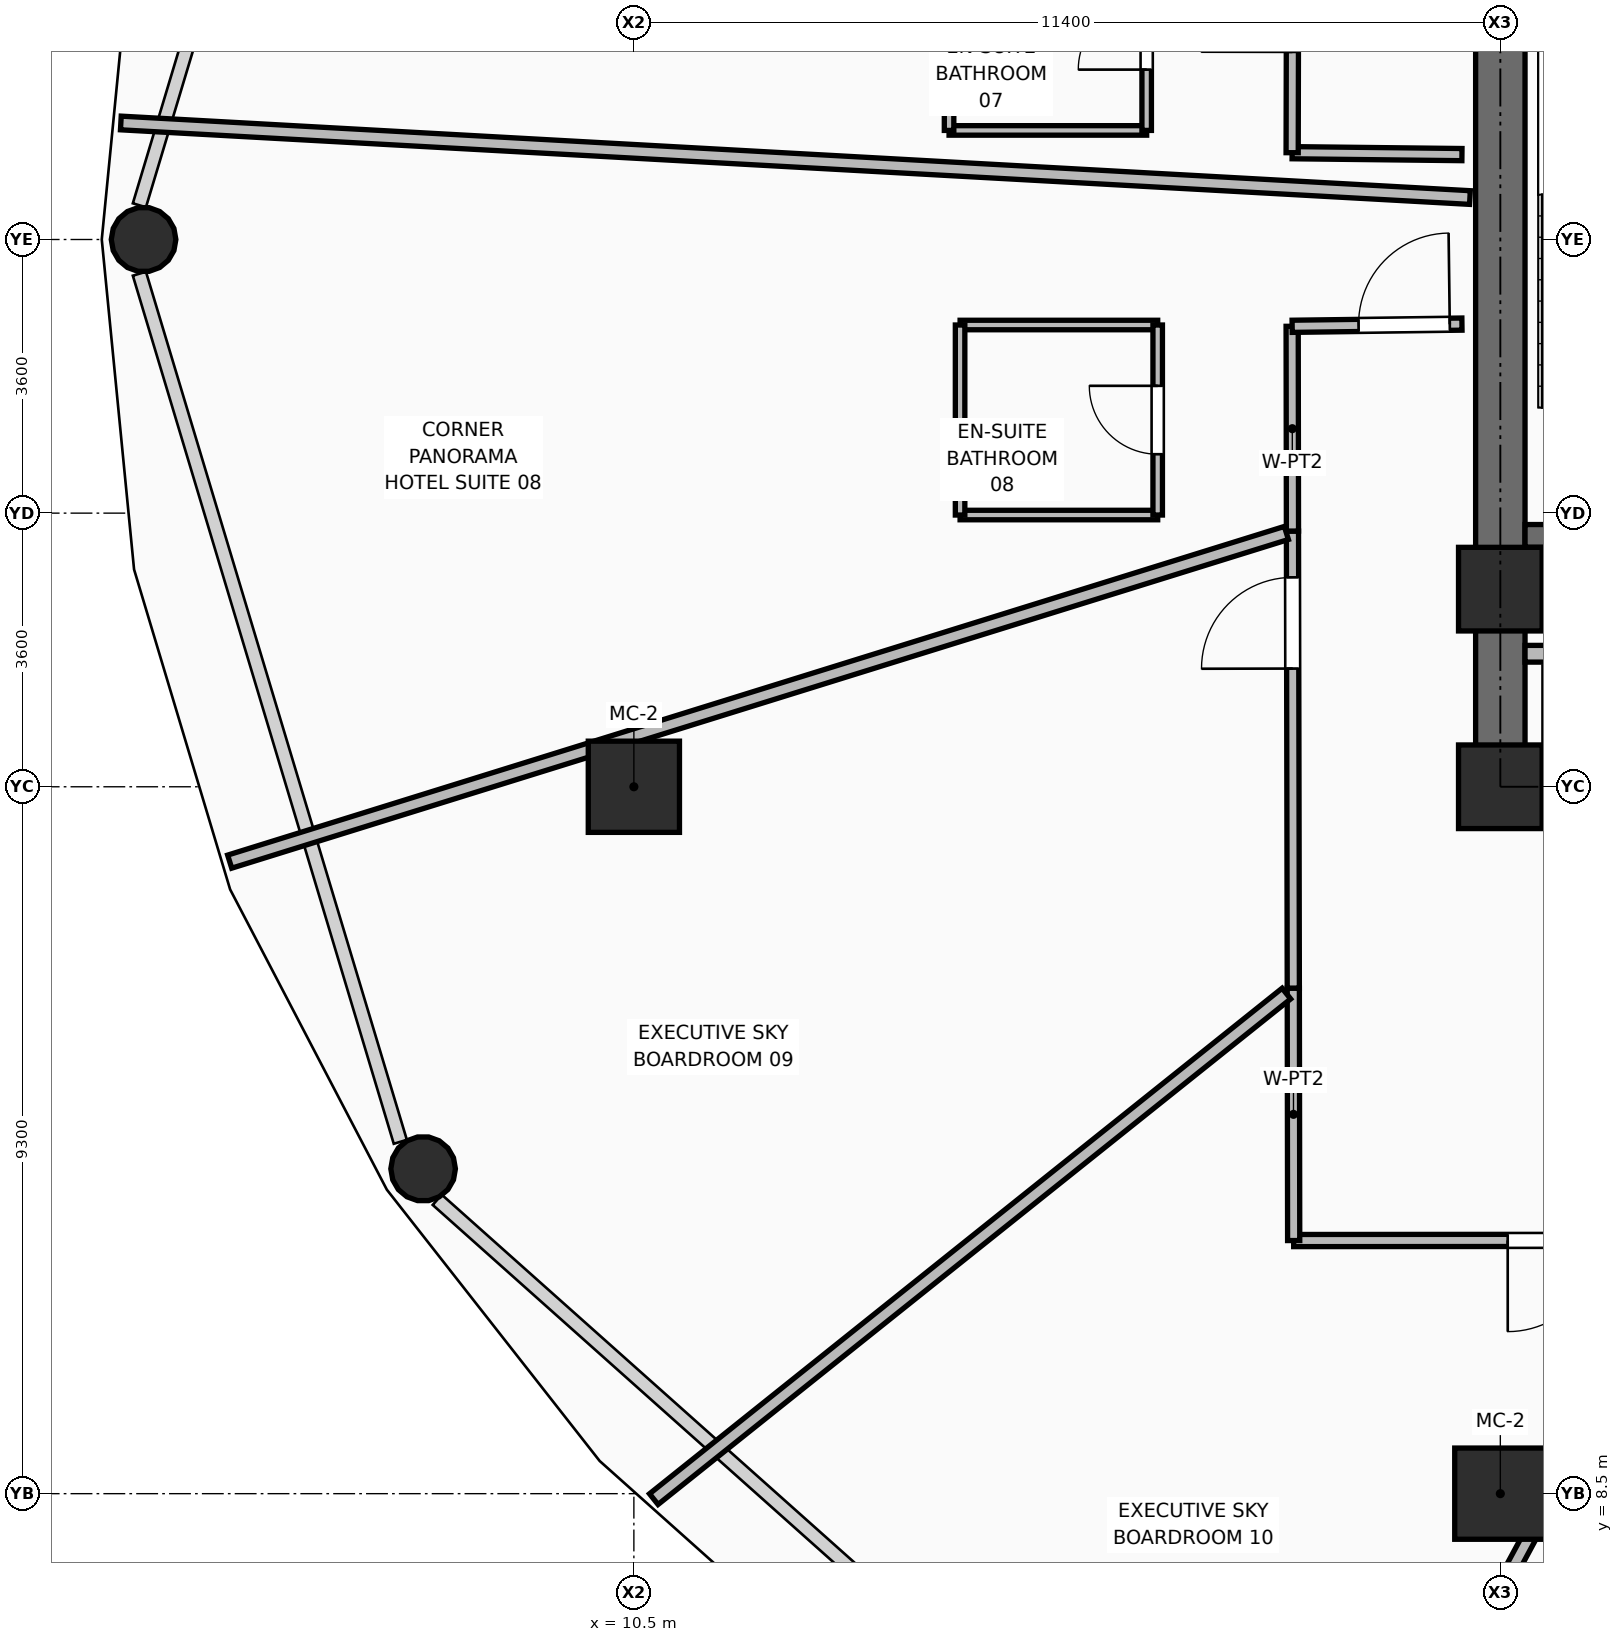
"""IFC4 building model, lengths in metres.
Left out: names, types, materials, properties, quantities, classifications, styles, units other than length and angle.
Written with IfcOpenShell. Run it as: python <this file> out.ifc"""

import sys

from ifc_helpers import new_model, si_unit, direction, frame, frame_2d, origin, origin_2d, place, context, subcontext, project, spatial, rectangle, hollow_rectangle, hollow_circle, extrude, element, fill, save


model = new_model("IFC4")
c1 = context("Model", 3, precision=1e-05, world=origin(), true_north=direction((0.0, 1.0)))
c2 = subcontext(c1, "Body", "Model", "MODEL_VIEW")
j1 = project(units=[si_unit("LENGTHUNIT", "METRE"), si_unit("PLANEANGLEUNIT", "RADIAN")], contexts=[c1])
p1 = place(None, origin())
s1 = spatial("IfcSite", under=j1, at=p1, CompositionType="ELEMENT")
p2 = place(p1, origin())
s2 = spatial("IfcBuilding", under=s1, at=p2, CompositionType="ELEMENT")
p3 = place(p2, frame((0.0, 0.0, 57.0)))
s3 = spatial("IfcBuildingStorey", under=s2, at=p3, CompositionType="ELEMENT", Elevation=57.0)
for number, where, z_axis, x_axis in (
    (1, (21.9, 17.8, 0.0), (0.0, 0.0, 1.0), (1.0, 0.0, 0.0)),
    (2, (21.9, 20.4, 0.0), (0.0, 0.0, 1.0), (1.0, 0.0, 0.0)),
):
    element("IfcColumn", number, at=place(p3, frame(where, z_axis=z_axis, x_axis=x_axis)), inside=s3, PredefinedType="COLUMN", context=c2, shape_type="SweptSolid", body=[
        extrude(rectangle(XDim=1.1, YDim=1.1, at=origin_2d()), origin(), (0.0, 0.0, 1.0), 3.75),
    ])
for number, where, z_axis, x_axis in (
    (3, (21.9, 8.5, 0.0), (0.0, 0.0, 1.0), (1.0, 0.0, 0.0)),
    (4, (10.5, 17.8, 0.0), (0.0, 0.0, 1.0), (1.0, 0.0, 0.0)),
):
    element("IfcColumn", number, at=place(p3, frame(where, z_axis=z_axis, x_axis=x_axis)), inside=s3, PredefinedType="COLUMN", context=c2, shape_type="SweptSolid", body=[
        extrude(hollow_rectangle(XDim=1.2, YDim=1.2, WallThickness=0.045, at=origin_2d()), origin(), (0.0, 0.0, 1.0), 3.75),
    ])
for number, where, z_axis, x_axis in (
    (5, (4.049, 25.0, 0.0), (0.0, 0.0, 1.0), (1.0, 0.0, 0.0)),
    (6, (7.727, 12.774, 0.0), (0.0, 0.0, 1.0), (1.0, 0.0, 0.0)),
):
    element("IfcColumn", number, at=place(p3, frame(where, z_axis=z_axis, x_axis=x_axis)), inside=s3, PredefinedType="COLUMN", context=c2, shape_type="SweptSolid", body=[
        extrude(hollow_circle(Radius=0.425, WallThickness=0.04, at=origin_2d()), origin(), (0.0, 0.0, 1.0), 3.57),
    ])
p4 = place(p3, frame((21.575, 17.8, 0.0), z_axis=(0.0, 0.0, 1.0), x_axis=(1.0, 0.0, 0.0)))
e7 = element("IfcWall", 7, at=p4, inside=s3, PredefinedType="SHEAR", context=c2, shape_type="SweptSolid", body=[
    extrude(rectangle(XDim=2.175, YDim=0.65, at=frame_2d((1.087, 0.0))), origin(), (0.0, 0.0, 1.0), 3.57),
])
p5 = place(p3, frame((21.9, 18.125, 0.0), z_axis=(0.0, 0.0, 1.0), x_axis=(0.0, 1.0, 0.0)))
e8 = element("IfcWall", 8, at=p5, inside=s3, PredefinedType="SHEAR", context=c2, shape_type="SweptSolid", body=[
    extrude(rectangle(XDim=14.0, YDim=0.65, at=frame_2d((7.0, 0.0))), origin(), (0.0, 0.0, 1.0), 3.57),
])
p6 = place(p3, frame((22.225, 21.1, 0.0), z_axis=(0.0, 0.0, 1.0), x_axis=(1.0, 0.0, 0.0)))
e9 = element("IfcWall", 9, at=p6, inside=s3, PredefinedType="SHEAR", context=c2, shape_type="SweptSolid", body=[
    extrude(rectangle(XDim=3.515, YDim=0.3, at=frame_2d((1.757, 0.0))), origin(), (0.0, 0.0, 1.0), 3.57),
])
p7 = place(p6, frame((1.995, 0.0, 0.0)))
e10 = element("IfcOpeningElement", 10, at=p7, cuts=e9, PredefinedType="OPENING", context=c2, shape_type="SweptSolid", body=[
    extrude(rectangle(XDim=1.05, YDim=2.1, at=frame_2d((0.525, 1.05))), frame((0.0, 0.16, 0.0), z_axis=(0.0, -1.0, 0.0), x_axis=(1.0, 0.0, 0.0)), (0.0, 0.0, 1.0), 0.32),
])
p8 = place(p3, frame((22.225, 19.55, 0.0), z_axis=(0.0, 0.0, 1.0), x_axis=(1.0, 0.0, 0.0)))
e11 = element("IfcWall", 11, at=p8, inside=s3, PredefinedType="PARTITIONING", context=c2, shape_type="SweptSolid", body=[
    extrude(rectangle(XDim=1.565, YDim=0.22, at=frame_2d((0.782, 0.0))), origin(), (0.0, 0.0, 1.0), 2.595),
])
p9 = place(p3, frame((21.395, 26.117, 0.0), z_axis=(0.0, 0.0, 1.0), x_axis=(-0.999936661747, 0.011254887571, 0.0)))
e12 = element("IfcWall", 12, at=p9, inside=s3, PredefinedType="PARTITIONING", context=c2, shape_type="SweptSolid", body=[
    extrude(rectangle(XDim=2.234, YDim=0.16, at=frame_2d((1.117, 0.0))), origin(), (0.0, 0.0, 1.0), 3.55),
])
p10 = place(p3, frame((19.161, 26.142, 0.0), z_axis=(0.0, 0.0, 1.0), x_axis=(0.002105737748, 0.999997782932, 0.0)))
e13 = element("IfcWall", 13, at=p10, inside=s3, PredefinedType="PARTITIONING", context=c2, shape_type="SweptSolid", body=[
    extrude(rectangle(XDim=4.29, YDim=0.16, at=frame_2d((2.145, 0.0))), origin(), (0.0, 0.0, 1.0), 3.55),
])
p11 = place(p10, frame((1.326, 0.0, 0.0)))
e14 = element("IfcOpeningElement", 14, at=p11, cuts=e13, PredefinedType="OPENING", context=c2, shape_type="SweptSolid", body=[
    extrude(rectangle(XDim=1.2, YDim=2.1, at=frame_2d((0.6, 1.05))), frame((0.0, 0.09, 0.0), z_axis=(0.0, -1.0, 0.0), x_axis=(1.0, 0.0, 0.0)), (0.0, 0.0, 1.0), 0.18),
])
p12 = place(p3, frame((24.39, 11.833, 0.0), z_axis=(0.0, 0.0, 1.0), x_axis=(-0.999999841836, -0.000562429607, 0.0)))
e15 = element("IfcWall", 15, at=p12, inside=s3, PredefinedType="PARTITIONING", context=c2, shape_type="SweptSolid", body=[
    extrude(rectangle(XDim=5.209, YDim=0.16, at=frame_2d((2.604, 0.0))), origin(), (0.0, 0.0, 1.0), 2.928),
])
p13 = place(p12, frame((1.193, 0.0, 0.0)))
e16 = element("IfcOpeningElement", 16, at=p13, cuts=e15, PredefinedType="OPENING", context=c2, shape_type="SweptSolid", body=[
    extrude(rectangle(XDim=1.2, YDim=2.1, at=frame_2d((0.6, 1.05))), frame((0.0, 0.09, 0.0), z_axis=(0.0, -1.0, 0.0), x_axis=(1.0, 0.0, 0.0)), (0.0, 0.0, 1.0), 0.18),
])
p14 = place(p3, frame((19.181, 11.83, 0.0), z_axis=(0.0, 0.0, 1.0), x_axis=(-0.001470370415, 0.999998919005, 0.0)))
e17 = element("IfcWall", 17, at=p14, inside=s3, PredefinedType="PARTITIONING", context=c2, shape_type="SweptSolid", body=[
    extrude(rectangle(XDim=3.321, YDim=0.16, at=frame_2d((1.66, 0.0))), origin(), (0.0, 0.0, 1.0), 3.55),
])
p15 = place(p3, frame((19.176, 15.151, 0.0), z_axis=(0.0, 0.0, 1.0), x_axis=(-0.001827037145, 0.999998330966, 0.0)))
e18 = element("IfcWall", 18, at=p15, inside=s3, PredefinedType="PARTITIONING", context=c2, shape_type="SweptSolid", body=[
    extrude(rectangle(XDim=6.013, YDim=0.16, at=frame_2d((3.007, 0.0))), origin(), (0.0, 0.0, 1.0), 2.928),
])
p16 = place(p15, frame((4.204, 0.0, 0.0)))
e19 = element("IfcOpeningElement", 19, at=p16, cuts=e18, PredefinedType="OPENING", context=c2, shape_type="SweptSolid", body=[
    extrude(rectangle(XDim=1.2, YDim=2.1, at=frame_2d((0.6, 1.05))), frame((0.0, 0.09, 0.0), z_axis=(0.0, -1.0, 0.0), x_axis=(1.0, 0.0, 0.0)), (0.0, 0.0, 1.0), 0.18),
])
p17 = place(p3, frame((19.165, 21.164, 0.0), z_axis=(0.0, 0.0, 1.0), x_axis=(-0.001540690577, 0.999998813136, 0.0)))
e20 = element("IfcWall", 20, at=p17, inside=s3, PredefinedType="PARTITIONING", context=c2, shape_type="SweptSolid", body=[
    extrude(rectangle(XDim=2.694, YDim=0.16, at=frame_2d((1.347, 0.0))), origin(), (0.0, 0.0, 1.0), 2.928),
])
p18 = place(p3, frame((19.161, 23.858, 0.0), z_axis=(0.0, 0.0, 1.0), x_axis=(0.999915458151, 0.013002943888, 0.0)))
e21 = element("IfcWall", 21, at=p18, inside=s3, PredefinedType="PARTITIONING", context=c2, shape_type="SweptSolid", body=[
    extrude(rectangle(XDim=2.234, YDim=0.16, at=frame_2d((1.117, 0.0))), origin(), (0.0, 0.0, 1.0), 3.55),
])
p19 = place(p18, frame((0.874, 0.0, 0.0)))
e22 = element("IfcOpeningElement", 22, at=p19, cuts=e21, PredefinedType="OPENING", context=c2, shape_type="SweptSolid", body=[
    extrude(rectangle(XDim=1.2, YDim=2.1, at=frame_2d((0.6, 1.05))), frame((0.0, 0.09, 0.0), z_axis=(0.0, -1.0, 0.0), x_axis=(1.0, 0.0, 0.0)), (0.0, 0.0, 1.0), 0.18),
])
p20 = place(p3, frame((21.5, 25.552, 0.0), z_axis=(0.0, 0.0, 1.0), x_axis=(-0.998476368936, 0.055180981107, 0.0)))
e23 = element("IfcWall", 23, at=p20, inside=s3, PredefinedType="PARTITIONING", context=c2, shape_type="SweptSolid", body=[
    extrude(rectangle(XDim=17.777, YDim=0.18, at=frame_2d((8.889, 0.0))), origin(), (0.0, 0.0, 1.0), 2.595),
])
p21 = place(p3, frame((19.085, 21.139, 0.0), z_axis=(0.0, 0.0, 1.0), x_axis=(-0.954884570259, -0.296977200271, 0.0)))
e24 = element("IfcWall", 24, at=p21, inside=s3, PredefinedType="PARTITIONING", context=c2, shape_type="SweptSolid", body=[
    extrude(rectangle(XDim=14.56, YDim=0.18, at=frame_2d((7.28, 0.0))), origin(), (0.0, 0.0, 1.0), 2.775),
])
p22 = place(p3, frame((19.085, 15.079, 0.0), z_axis=(0.0, 0.0, 1.0), x_axis=(-0.781201807071, -0.624278572938, 0.0)))
e25 = element("IfcWall", 25, at=p22, inside=s3, PredefinedType="PARTITIONING", context=c2, shape_type="SweptSolid", body=[
    extrude(rectangle(XDim=10.654, YDim=0.18, at=frame_2d((5.327, 0.0))), origin(), (0.0, 0.0, 1.0), 2.775),
])
p23 = place(p3, frame((24.345, 11.75, 0.0), z_axis=(0.0, 0.0, 1.0), x_axis=(-0.475165367646, -0.879896512887, 0.0)))
e26 = element("IfcWall", 26, at=p23, inside=s3, PredefinedType="PARTITIONING", context=c2, shape_type="SweptSolid", body=[
    extrude(rectangle(XDim=10.34, YDim=0.18, at=frame_2d((5.17, 0.0))), origin(), (0.0, 0.0, 1.0), 2.775),
])
p24 = place(p3, frame((14.647, 26.435, 0.0), z_axis=(0.0, 0.0, 1.0), x_axis=(1.0, 0.0, 0.0)))
e27 = element("IfcWall", 27, at=p24, inside=s3, PredefinedType="PARTITIONING", context=c2, shape_type="SweptSolid", body=[
    extrude(rectangle(XDim=2.6, YDim=0.125, at=frame_2d((1.3, 0.0))), origin(), (0.0, 0.0, 1.0), 3.55),
])
p25 = place(p3, frame((14.647, 26.435, 0.0), z_axis=(0.0, 0.0, 1.0), x_axis=(0.0, 1.0, 0.0)))
e28 = element("IfcWall", 28, at=p25, inside=s3, PredefinedType="PARTITIONING", context=c2, shape_type="SweptSolid", body=[
    extrude(rectangle(XDim=2.5, YDim=0.125, at=frame_2d((1.25, 0.0))), origin(), (0.0, 0.0, 1.0), 3.55),
])
p26 = place(p3, frame((17.247, 26.435, 0.0), z_axis=(0.0, 0.0, 1.0), x_axis=(0.0, 1.0, 0.0)))
e29 = element("IfcWall", 29, at=p26, inside=s3, PredefinedType="PARTITIONING", context=c2, shape_type="SweptSolid", body=[
    extrude(rectangle(XDim=2.5, YDim=0.125, at=frame_2d((1.25, 0.0))), origin(), (0.0, 0.0, 1.0), 3.55),
])
p27 = place(p26, frame((0.8, 0.0, 0.0)))
e30 = element("IfcOpeningElement", 30, at=p27, cuts=e29, PredefinedType="OPENING", context=c2, shape_type="SweptSolid", body=[
    extrude(rectangle(XDim=0.9, YDim=2.1, at=frame_2d((0.45, 1.05))), frame((0.0, 0.073, 0.0), z_axis=(0.0, -1.0, 0.0), x_axis=(1.0, 0.0, 0.0)), (0.0, 0.0, 1.0), 0.145),
])
p28 = place(p3, frame((14.792, 21.375, 0.0), z_axis=(0.0, 0.0, 1.0), x_axis=(1.0, 0.0, 0.0)))
e31 = element("IfcWall", 31, at=p28, inside=s3, PredefinedType="PARTITIONING", context=c2, shape_type="SweptSolid", body=[
    extrude(rectangle(XDim=2.6, YDim=0.125, at=frame_2d((1.3, 0.0))), origin(), (0.0, 0.0, 1.0), 2.928),
])
p29 = place(p3, frame((14.792, 23.875, 0.0), z_axis=(0.0, 0.0, 1.0), x_axis=(1.0, 0.0, 0.0)))
e32 = element("IfcWall", 32, at=p29, inside=s3, PredefinedType="PARTITIONING", context=c2, shape_type="SweptSolid", body=[
    extrude(rectangle(XDim=2.6, YDim=0.125, at=frame_2d((1.3, 0.0))), origin(), (0.0, 0.0, 1.0), 3.55),
])
p30 = place(p3, frame((14.792, 21.375, 0.0), z_axis=(0.0, 0.0, 1.0), x_axis=(0.0, 1.0, 0.0)))
e33 = element("IfcWall", 33, at=p30, inside=s3, PredefinedType="PARTITIONING", context=c2, shape_type="SweptSolid", body=[
    extrude(rectangle(XDim=2.5, YDim=0.125, at=frame_2d((1.25, 0.0))), origin(), (0.0, 0.0, 1.0), 2.928),
])
p31 = place(p3, frame((17.392, 21.375, 0.0), z_axis=(0.0, 0.0, 1.0), x_axis=(0.0, 1.0, 0.0)))
e34 = element("IfcWall", 34, at=p31, inside=s3, PredefinedType="PARTITIONING", context=c2, shape_type="SweptSolid", body=[
    extrude(rectangle(XDim=2.5, YDim=0.125, at=frame_2d((1.25, 0.0))), origin(), (0.0, 0.0, 1.0), 2.928),
])
p32 = place(p31, frame((0.8, 0.0, 0.0)))
e35 = element("IfcOpeningElement", 35, at=p32, cuts=e34, PredefinedType="OPENING", context=c2, shape_type="SweptSolid", body=[
    extrude(rectangle(XDim=0.9, YDim=2.1, at=frame_2d((0.45, 1.05))), frame((0.0, 0.073, 0.0), z_axis=(0.0, -1.0, 0.0), x_axis=(1.0, 0.0, 0.0)), (0.0, 0.0, 1.0), 0.145),
])
p33 = place(p27, origin())
e36 = element("IfcDoor", 36, at=p33, inside=s3, OperationType="SINGLE_SWING_LEFT", PredefinedType="DOOR", context=c2, shape_type="SweptSolid", body=[
    extrude(rectangle(XDim=0.9, YDim=2.1, at=frame_2d((0.45, 1.05))), frame((0.0, 0.025, 0.0), z_axis=(0.0, -1.0, 0.0), x_axis=(1.0, 0.0, 0.0)), (0.0, 0.0, 1.0), 0.05),
])
fill(e30, e36)
p34 = place(p32, origin())
e37 = element("IfcDoor", 37, at=p34, inside=s3, OperationType="SINGLE_SWING_RIGHT", PredefinedType="DOOR", context=c2, shape_type="SweptSolid", body=[
    extrude(rectangle(XDim=0.9, YDim=2.1, at=frame_2d((0.45, 1.05))), frame((0.0, 0.025, 0.0), z_axis=(0.0, -1.0, 0.0), x_axis=(1.0, 0.0, 0.0)), (0.0, 0.0, 1.0), 0.05),
])
fill(e35, e37)
p35 = place(p19, origin())
e38 = element("IfcDoor", 38, at=p35, inside=s3, OperationType="SINGLE_SWING_RIGHT", PredefinedType="DOOR", context=c2, shape_type="SweptSolid", body=[
    extrude(rectangle(XDim=1.2, YDim=2.1, at=frame_2d((0.6, 1.05))), frame((0.0, 0.025, 0.0), z_axis=(0.0, -1.0, 0.0), x_axis=(1.0, 0.0, 0.0)), (0.0, 0.0, 1.0), 0.05),
])
fill(e22, e38)
p36 = place(p16, origin())
e39 = element("IfcDoor", 39, at=p36, inside=s3, OperationType="SINGLE_SWING_LEFT", PredefinedType="DOOR", context=c2, shape_type="SweptSolid", body=[
    extrude(rectangle(XDim=1.2, YDim=2.1, at=frame_2d((0.6, 1.05))), frame((0.0, 0.025, 0.0), z_axis=(0.0, -1.0, 0.0), x_axis=(1.0, 0.0, 0.0)), (0.0, 0.0, 1.0), 0.05),
])
fill(e19, e39)
p37 = place(p13, origin())
e40 = element("IfcDoor", 40, at=p37, inside=s3, OperationType="SINGLE_SWING_RIGHT", PredefinedType="DOOR", context=c2, shape_type="SweptSolid", body=[
    extrude(rectangle(XDim=1.2, YDim=2.1, at=frame_2d((0.6, 1.05))), frame((0.0, 0.025, 0.0), z_axis=(0.0, -1.0, 0.0), x_axis=(1.0, 0.0, 0.0)), (0.0, 0.0, 1.0), 0.05),
])
fill(e16, e40)
save(model, sys.argv[1])
